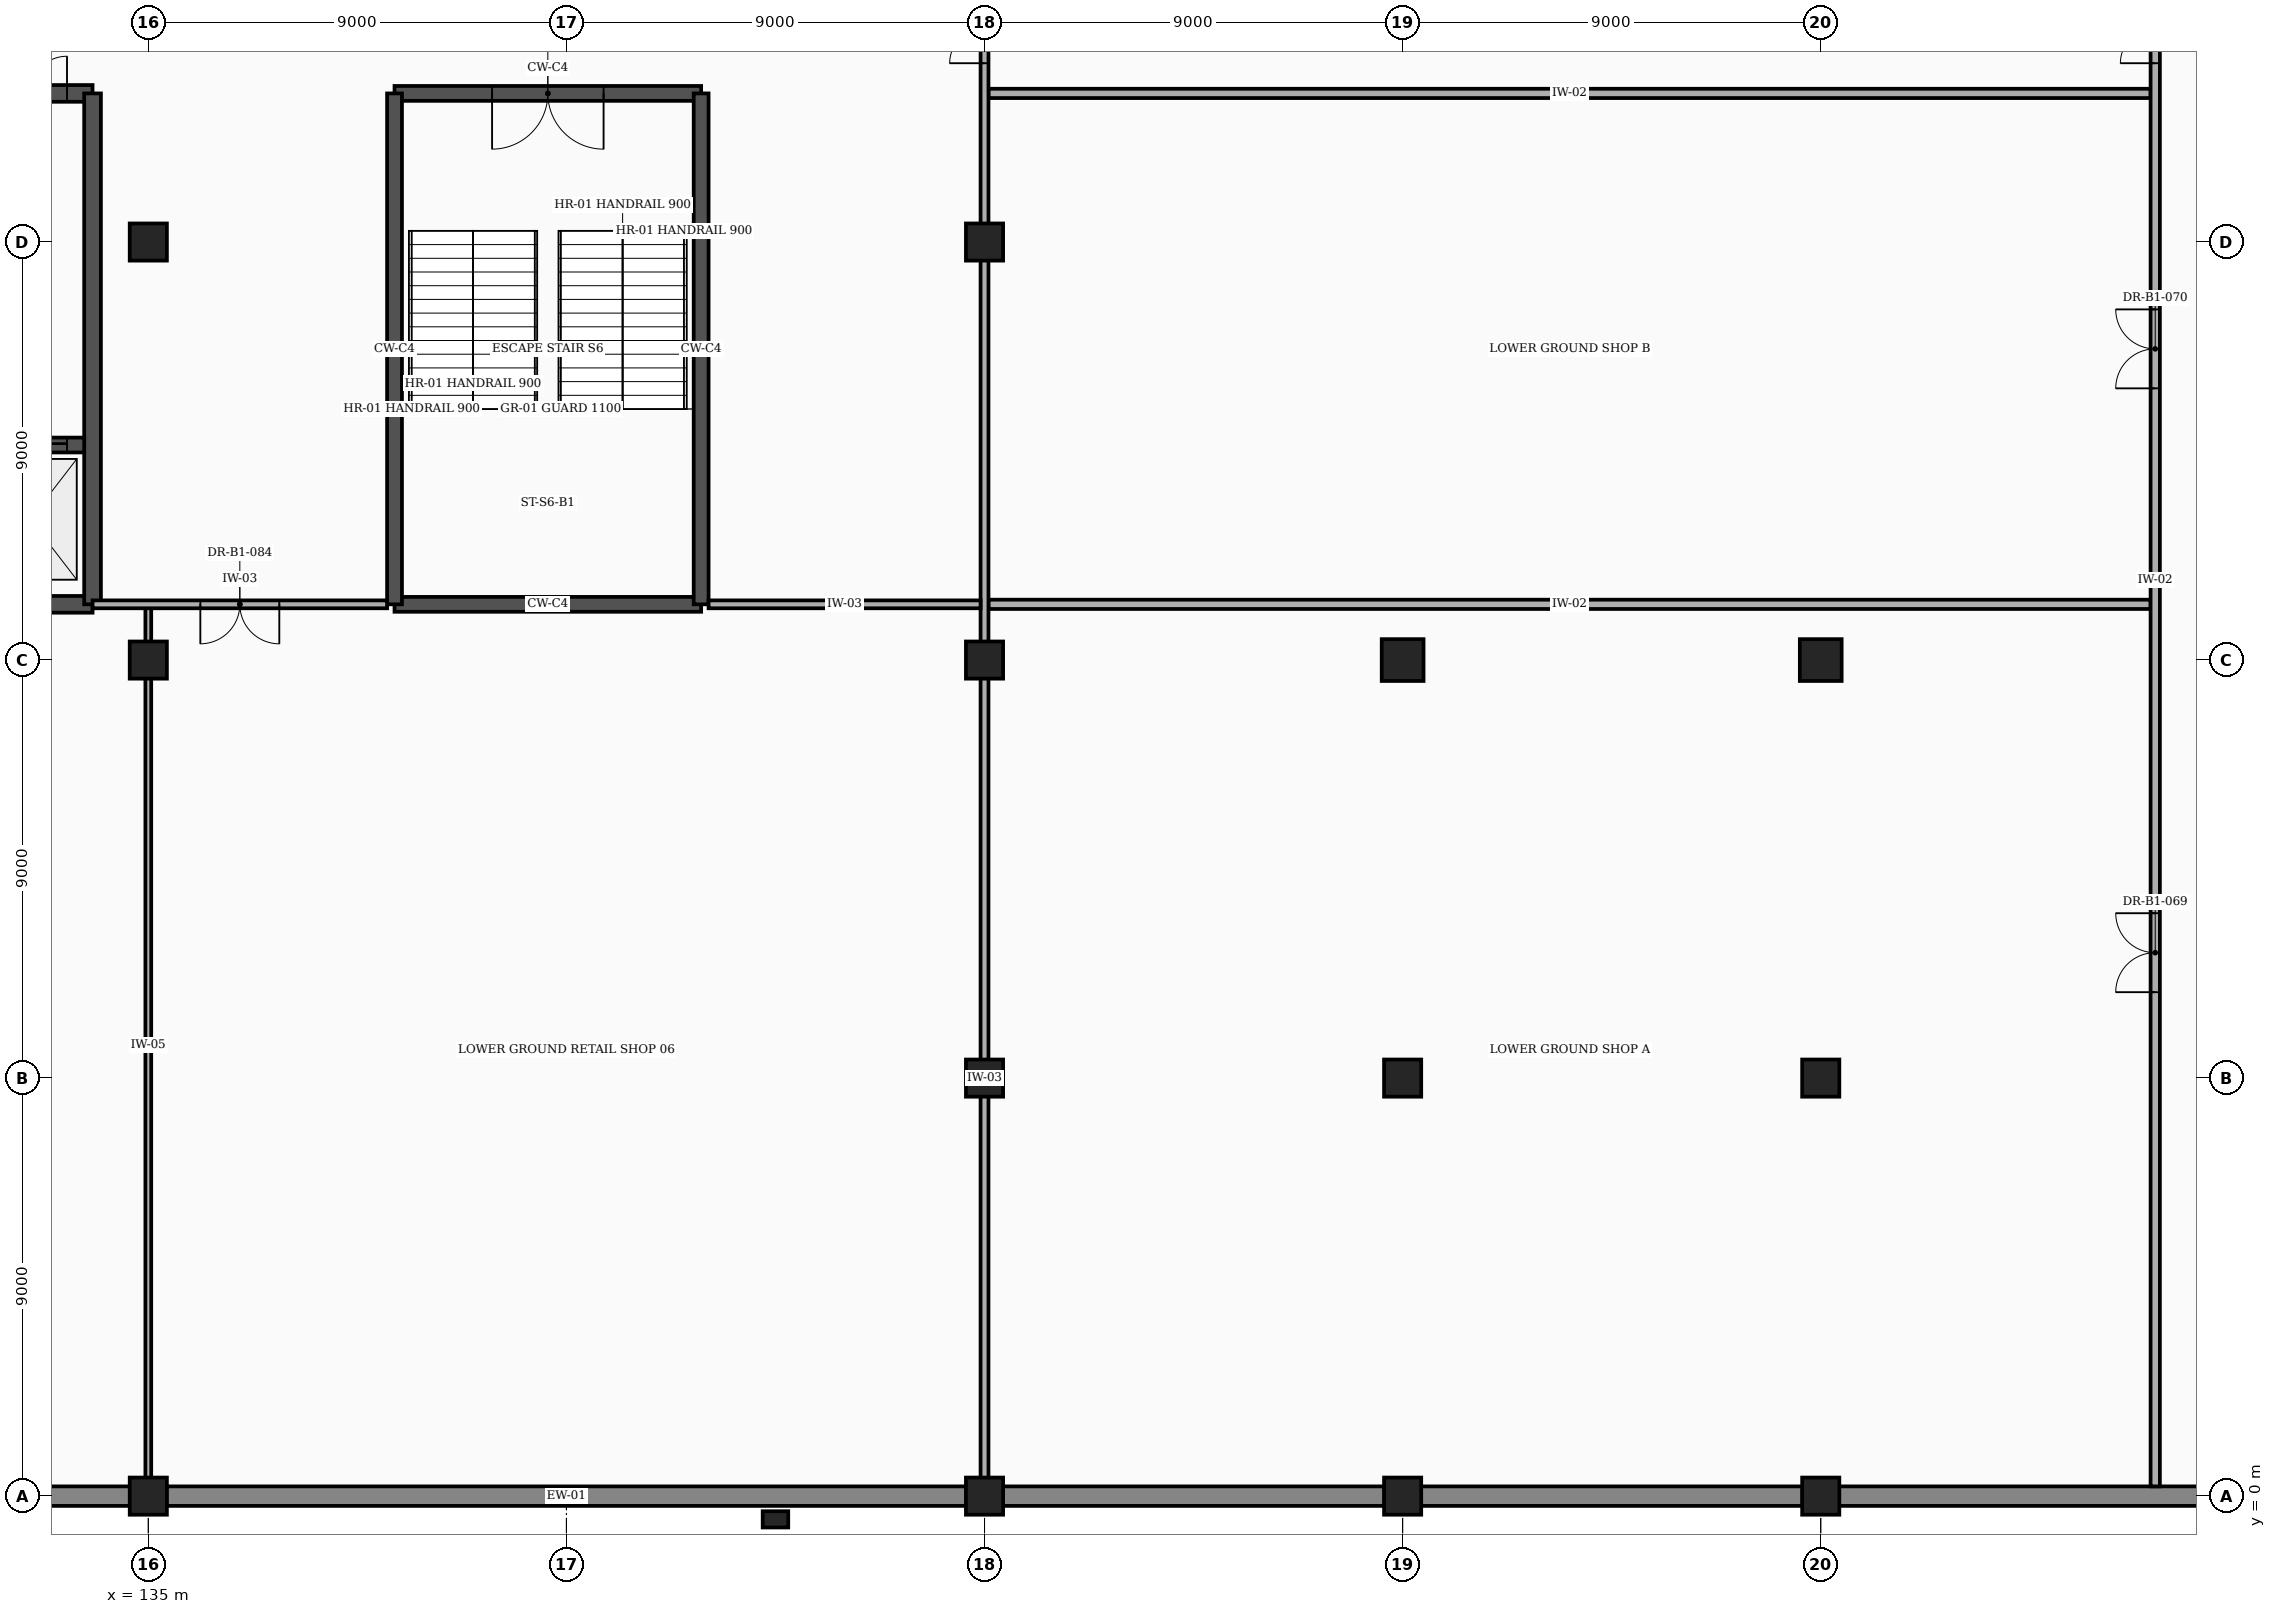
"""IFC4 building model, lengths in metres.
Left out: names, types, materials, properties, quantities, classifications, styles, units other than length and angle.
Written with IfcOpenShell. Run it as: python <this file> out.ifc"""

import sys

from ifc_helpers import new_model, si_unit, direction, frame, frame_2d, origin, origin_2d, place, context, subcontext, project, spatial, rectangle, extrude, element, fill, save


model = new_model("IFC4")
c1 = context("Model", 3, precision=1e-05, world=origin(), true_north=direction((0.0, 1.0)))
c2 = subcontext(c1, "Body", "Model", "MODEL_VIEW")
j1 = project(units=[si_unit("LENGTHUNIT", "METRE"), si_unit("PLANEANGLEUNIT", "RADIAN")], contexts=[c1])
p1 = place(None, origin())
s1 = spatial("IfcSite", under=j1, at=p1, CompositionType="ELEMENT")
p2 = place(p1, origin())
s2 = spatial("IfcBuilding", under=s1, at=p2, CompositionType="ELEMENT")
p3 = place(p2, frame((0.0, 0.0, -4.5)))
s3 = spatial("IfcBuildingStorey", under=s2, at=p3, CompositionType="ELEMENT", Elevation=-4.5)
for number, where, z_axis, x_axis in (
    (1, (135.0, 0.0, -0.45), (0.0, 0.0, 1.0), (1.0, 0.0, 0.0)),
    (2, (135.0, 18.0, -0.45), (0.0, 0.0, 1.0), (1.0, 0.0, 0.0)),
    (3, (135.0, 27.0, -0.45), (0.0, 0.0, 1.0), (1.0, 0.0, 0.0)),
    (4, (153.0, 0.0, -0.45), (0.0, 0.0, 1.0), (1.0, 0.0, 0.0)),
    (5, (153.0, 9.0, -0.45), (0.0, 0.0, 1.0), (1.0, 0.0, 0.0)),
    (6, (153.0, 18.0, -0.45), (0.0, 0.0, 1.0), (1.0, 0.0, 0.0)),
    (7, (153.0, 27.0, -0.45), (0.0, 0.0, 1.0), (1.0, 0.0, 0.0)),
    (8, (162.0, 0.0, -0.45), (0.0, 0.0, 1.0), (1.0, 0.0, 0.0)),
    (9, (162.0, 9.0, -0.45), (0.0, 0.0, 1.0), (1.0, 0.0, 0.0)),
):
    element("IfcColumn", number, at=place(p3, frame(where, z_axis=z_axis, x_axis=x_axis)), inside=s3, PredefinedType="COLUMN", context=c2, shape_type="SweptSolid", body=[
        extrude(rectangle(XDim=0.8, YDim=0.8, at=origin_2d()), origin(), (0.0, 0.0, 1.0), 4.95),
    ])
p4 = place(p3, frame((162.0, 18.0, -0.45), z_axis=(0.0, 0.0, 1.0), x_axis=(1.0, 0.0, 0.0)))
e10 = element("IfcColumn", 10, at=p4, inside=s3, PredefinedType="COLUMN", context=c2, shape_type="SweptSolid", body=[
    extrude(rectangle(XDim=0.9, YDim=0.9, at=origin_2d()), origin(), (0.0, 0.0, 1.0), 4.95),
])
for number, where, z_axis, x_axis in (
    (11, (171.0, 0.0, -0.45), (0.0, 0.0, 1.0), (1.0, 0.0, 0.0)),
    (12, (171.0, 9.0, -0.45), (0.0, 0.0, 1.0), (1.0, 0.0, 0.0)),
):
    element("IfcColumn", number, at=place(p3, frame(where, z_axis=z_axis, x_axis=x_axis)), inside=s3, PredefinedType="COLUMN", context=c2, shape_type="SweptSolid", body=[
        extrude(rectangle(XDim=0.8, YDim=0.8, at=origin_2d()), origin(), (0.0, 0.0, 1.0), 4.95),
    ])
p5 = place(p3, frame((171.0, 18.0, -0.45), z_axis=(0.0, 0.0, 1.0), x_axis=(1.0, 0.0, 0.0)))
e13 = element("IfcColumn", 13, at=p5, inside=s3, PredefinedType="COLUMN", context=c2, shape_type="SweptSolid", body=[
    extrude(rectangle(XDim=0.9, YDim=0.9, at=origin_2d()), origin(), (0.0, 0.0, 1.0), 4.95),
])
p6 = place(p3, frame((148.5, -0.5, -0.45), z_axis=(0.0, 0.0, 1.0), x_axis=(1.0, 0.0, 0.0)))
e14 = element("IfcColumn", 14, at=p6, inside=s3, PredefinedType="PILASTER", context=c2, shape_type="SweptSolid", body=[
    extrude(rectangle(XDim=0.55, YDim=0.35, at=origin_2d()), origin(), (0.0, 0.0, 1.0), 4.95),
])
for number, where, z_axis, x_axis in (
    (15, (117.392, 0.0, 0.0), (0.0, 0.0, 1.0), (1.0, 0.0, 0.0)),
    (16, (135.392, 0.0, 0.0), (0.0, 0.0, 1.0), (1.0, 0.0, 0.0)),
):
    element("IfcWall", number, at=place(p3, frame(where, z_axis=z_axis, x_axis=x_axis)), inside=s3, PredefinedType="STANDARD", context=c2, shape_type="SweptSolid", body=[
        extrude(rectangle(XDim=17.216, YDim=0.42, at=frame_2d((8.608, 0.0))), origin(), (0.0, 0.0, 1.0), 3.7),
    ])
for number, where, z_axis, x_axis in (
    (17, (153.392, 0.0, 0.0), (0.0, 0.0, 1.0), (1.0, 0.0, 0.0)),
    (18, (162.392, 0.0, 0.0), (0.0, 0.0, 1.0), (1.0, 0.0, 0.0)),
):
    element("IfcWall", number, at=place(p3, frame(where, z_axis=z_axis, x_axis=x_axis)), inside=s3, PredefinedType="STANDARD", context=c2, shape_type="SweptSolid", body=[
        extrude(rectangle(XDim=8.216, YDim=0.42, at=frame_2d((4.108, 0.0))), origin(), (0.0, 0.0, 1.0), 3.7),
    ])
p7 = place(p3, frame((171.392, 0.0, 0.0), z_axis=(0.0, 0.0, 1.0), x_axis=(1.0, 0.0, 0.0)))
e19 = element("IfcWall", 19, at=p7, inside=s3, PredefinedType="STANDARD", context=c2, shape_type="SweptSolid", body=[
    extrude(rectangle(XDim=17.216, YDim=0.42, at=frame_2d((8.608, 0.0))), origin(), (0.0, 0.0, 1.0), 3.7),
])
p8 = place(p3, frame((127.2, 19.2, 0.0), z_axis=(0.0, 0.0, 1.0), x_axis=(1.0, 0.0, 0.0)))
e20 = element("IfcWall", 20, at=p8, inside=s3, PredefinedType="SHEAR", context=c2, shape_type="SweptSolid", body=[
    extrude(rectangle(XDim=6.6, YDim=0.36, at=frame_2d((3.3, 0.0))), origin(), (0.0, 0.0, 1.0), 4.24),
])
p9 = place(p3, frame((127.2, 30.2, 0.0), z_axis=(0.0, 0.0, 1.0), x_axis=(1.0, 0.0, 0.0)))
e21 = element("IfcWall", 21, at=p9, inside=s3, PredefinedType="SHEAR", context=c2, shape_type="SweptSolid", body=[
    extrude(rectangle(XDim=6.6, YDim=0.36, at=frame_2d((3.3, 0.0))), origin(), (0.0, 0.0, 1.0), 4.24),
])
p10 = place(p9, frame((4.45, 0.0, 0.0)))
e22 = element("IfcOpeningElement", 22, at=p10, cuts=e21, PredefinedType="OPENING", context=c2, shape_type="SweptSolid", body=[
    extrude(rectangle(XDim=1.6, YDim=2.3, at=frame_2d((0.8, 1.15))), frame((0.0, 0.192, 0.0), z_axis=(0.0, -1.0, 0.0), x_axis=(1.0, 0.0, 0.0)), (0.0, 0.0, 1.0), 0.384),
])
p11 = place(p3, frame((133.8, 19.2, 0.0), z_axis=(0.0, 0.0, 1.0), x_axis=(0.0, 1.0, 0.0)))
e23 = element("IfcWall", 23, at=p11, inside=s3, PredefinedType="SHEAR", context=c2, shape_type="SweptSolid", body=[
    extrude(rectangle(XDim=11.0, YDim=0.36, at=frame_2d((5.5, 0.0))), origin(), (0.0, 0.0, 1.0), 4.24),
])
p12 = place(p3, frame((131.3, 22.63, 0.0), z_axis=(0.0, 0.0, 1.0), x_axis=(1.0, 0.0, 0.0)))
e24 = element("IfcWall", 24, at=p12, inside=s3, PredefinedType="SHEAR", context=c2, shape_type="SweptSolid", body=[
    extrude(rectangle(XDim=2.32, YDim=0.32, at=frame_2d((1.16, 0.0))), origin(), (0.0, 0.0, 1.0), 4.24),
])
p13 = place(p12, frame((0.3, 0.0, 0.0)))
e25 = element("IfcOpeningElement", 25, at=p13, cuts=e24, PredefinedType="OPENING", context=c2, shape_type="SweptSolid", body=[
    extrude(rectangle(XDim=1.65, YDim=2.35, at=frame_2d((0.825, 1.175))), frame((0.0, 0.172, 0.0), z_axis=(0.0, -1.0, 0.0), x_axis=(1.0, 0.0, 0.0)), (0.0, 0.0, 1.0), 0.344),
])
p14 = place(p3, frame((140.3, 19.2, 0.0), z_axis=(0.0, 0.0, 1.0), x_axis=(1.0, 0.0, 0.0)))
e26 = element("IfcWall", 26, at=p14, inside=s3, PredefinedType="SHEAR", context=c2, shape_type="SweptSolid", body=[
    extrude(rectangle(XDim=6.6, YDim=0.32, at=frame_2d((3.3, 0.0))), origin(), (0.0, 0.0, 1.0), 4.24),
])
p15 = place(p3, frame((140.3, 30.2, 0.0), z_axis=(0.0, 0.0, 1.0), x_axis=(1.0, 0.0, 0.0)))
e27 = element("IfcWall", 27, at=p15, inside=s3, PredefinedType="SHEAR", context=c2, shape_type="SweptSolid", body=[
    extrude(rectangle(XDim=6.6, YDim=0.32, at=frame_2d((3.3, 0.0))), origin(), (0.0, 0.0, 1.0), 4.24),
])
p16 = place(p15, frame((2.1, 0.0, 0.0)))
e28 = element("IfcOpeningElement", 28, at=p16, cuts=e27, PredefinedType="OPENING", context=c2, shape_type="SweptSolid", body=[
    extrude(rectangle(XDim=2.4, YDim=2.25, at=frame_2d((1.2, 1.125))), frame((0.0, 0.172, 0.0), z_axis=(0.0, -1.0, 0.0), x_axis=(1.0, 0.0, 0.0)), (0.0, 0.0, 1.0), 0.344),
])
for number, where, z_axis, x_axis in (
    (29, (140.3, 19.2, 0.0), (0.0, 0.0, 1.0), (0.0, 1.0, 0.0)),
    (30, (146.9, 19.2, 0.0), (0.0, 0.0, 1.0), (0.0, 1.0, 0.0)),
):
    element("IfcWall", number, at=place(p3, frame(where, z_axis=z_axis, x_axis=x_axis)), inside=s3, PredefinedType="SHEAR", context=c2, shape_type="SweptSolid", body=[
        extrude(rectangle(XDim=11.0, YDim=0.32, at=frame_2d((5.5, 0.0))), origin(), (0.0, 0.0, 1.0), 4.24),
    ])
for number, where, z_axis, x_axis in (
    (31, (153.085, 19.2, 0.0), (0.0, 0.0, 1.0), (1.0, 0.0, 0.0)),
    (32, (153.085, 30.2, 0.0), (0.0, 0.0, 1.0), (1.0, 0.0, 0.0)),
):
    element("IfcWall", number, at=place(p3, frame(where, z_axis=z_axis, x_axis=x_axis)), inside=s3, PredefinedType="PARTITIONING", context=c2, shape_type="SweptSolid", body=[
        extrude(rectangle(XDim=25.015, YDim=0.2, at=frame_2d((12.508, 0.0))), origin(), (0.0, 0.0, 1.0), 4.24),
    ])
p17 = place(p3, frame((178.2, 0.21, 0.0), z_axis=(0.0, 0.0, 1.0), x_axis=(0.0, 1.0, 0.0)))
e33 = element("IfcWall", 33, at=p17, inside=s3, PredefinedType="PARTITIONING", context=c2, shape_type="SweptSolid", body=[
    extrude(rectangle(XDim=39.03, YDim=0.2, at=frame_2d((19.515, 0.0))), origin(), (0.0, 0.0, 1.0), 4.24),
])
p18 = place(p17, frame((10.64, 0.0, 0.0)))
e34 = element("IfcOpeningElement", 34, at=p18, cuts=e33, PredefinedType="OPENING", context=c2, shape_type="SweptSolid", body=[
    extrude(rectangle(XDim=1.7, YDim=2.3, at=frame_2d((0.85, 1.15))), frame((0.0, 0.112, 0.0), z_axis=(0.0, -1.0, 0.0), x_axis=(1.0, 0.0, 0.0)), (0.0, 0.0, 1.0), 0.224),
])
p19 = place(p17, frame((23.64, 0.0, 0.0)))
e35 = element("IfcOpeningElement", 35, at=p19, cuts=e33, PredefinedType="OPENING", context=c2, shape_type="SweptSolid", body=[
    extrude(rectangle(XDim=1.7, YDim=2.3, at=frame_2d((0.85, 1.15))), frame((0.0, 0.112, 0.0), z_axis=(0.0, -1.0, 0.0), x_axis=(1.0, 0.0, 0.0)), (0.0, 0.0, 1.0), 0.224),
])
p20 = place(p17, frame((30.64, 0.0, 0.0)))
e36 = element("IfcOpeningElement", 36, at=p20, cuts=e33, PredefinedType="OPENING", context=c2, shape_type="SweptSolid", body=[
    extrude(rectangle(XDim=1.5, YDim=2.2, at=frame_2d((0.75, 1.1))), frame((0.0, 0.112, 0.0), z_axis=(0.0, -1.0, 0.0), x_axis=(1.0, 0.0, 0.0)), (0.0, 0.0, 1.0), 0.224),
])
p21 = place(p3, frame((153.0, 0.22, 0.0), z_axis=(0.0, 0.0, 1.0), x_axis=(0.0, 1.0, 0.0)))
e37 = element("IfcWall", 37, at=p21, inside=s3, PredefinedType="PARTITIONING", context=c2, shape_type="SweptSolid", body=[
    extrude(rectangle(XDim=17.56, YDim=0.17, at=frame_2d((8.78, 0.0))), origin(), (0.0, 0.0, 1.0), 3.707),
])
p22 = place(p3, frame((153.0, 18.22, 0.0), z_axis=(0.0, 0.0, 1.0), x_axis=(0.0, 1.0, 0.0)))
e38 = element("IfcWall", 38, at=p22, inside=s3, PredefinedType="PARTITIONING", context=c2, shape_type="SweptSolid", body=[
    extrude(rectangle(XDim=8.56, YDim=0.17, at=frame_2d((4.28, 0.0))), origin(), (0.0, 0.0, 1.0), 3.707),
])
p23 = place(p3, frame((153.0, 27.22, 0.0), z_axis=(0.0, 0.0, 1.0), x_axis=(0.0, 1.0, 0.0)))
e39 = element("IfcWall", 39, at=p23, inside=s3, PredefinedType="PARTITIONING", context=c2, shape_type="SweptSolid", body=[
    extrude(rectangle(XDim=8.56, YDim=0.17, at=frame_2d((4.28, 0.0))), origin(), (0.0, 0.0, 1.0), 3.707),
])
p24 = place(p23, frame((3.63, 0.0, 0.0)))
e40 = element("IfcOpeningElement", 40, at=p24, cuts=e39, PredefinedType="OPENING", context=c2, shape_type="SweptSolid", body=[
    extrude(rectangle(XDim=1.5, YDim=2.2, at=frame_2d((0.75, 1.1))), frame((0.0, 0.097, 0.0), z_axis=(0.0, -1.0, 0.0), x_axis=(1.0, 0.0, 0.0)), (0.0, 0.0, 1.0), 0.194),
])
p25 = place(p3, frame((135.0, 0.21, 0.0), z_axis=(0.0, 0.0, 1.0), x_axis=(0.0, 1.0, 0.0)))
e41 = element("IfcWall", 41, at=p25, inside=s3, PredefinedType="PARTITIONING", context=c2, shape_type="SweptSolid", body=[
    extrude(rectangle(XDim=18.99, YDim=0.125, at=frame_2d((9.495, 0.0))), origin(), (0.0, 0.0, 1.0), 3.628),
])
p26 = place(p3, frame((133.8, 19.2, 0.0), z_axis=(0.0, 0.0, 1.0), x_axis=(1.0, 0.0, 0.0)))
e42 = element("IfcWall", 42, at=p26, inside=s3, PredefinedType="PARTITIONING", context=c2, shape_type="SweptSolid", body=[
    extrude(rectangle(XDim=6.34, YDim=0.17, at=frame_2d((3.17, 0.0))), origin(), (0.0, 0.0, 1.0), 4.24),
])
p27 = place(p26, frame((2.32, 0.0, 0.0)))
e43 = element("IfcOpeningElement", 43, at=p27, cuts=e42, PredefinedType="OPENING", context=c2, shape_type="SweptSolid", body=[
    extrude(rectangle(XDim=1.7, YDim=2.3, at=frame_2d((0.85, 1.15))), frame((0.0, 0.097, 0.0), z_axis=(0.0, -1.0, 0.0), x_axis=(1.0, 0.0, 0.0)), (0.0, 0.0, 1.0), 0.194),
])
p28 = place(p3, frame((147.06, 19.2, 0.0), z_axis=(0.0, 0.0, 1.0), x_axis=(1.0, 0.0, 0.0)))
e44 = element("IfcWall", 44, at=p28, inside=s3, PredefinedType="PARTITIONING", context=c2, shape_type="SweptSolid", body=[
    extrude(rectangle(XDim=5.855, YDim=0.17, at=frame_2d((2.927, 0.0))), origin(), (0.0, 0.0, 1.0), 4.24),
])
p29 = place(p13, origin())
e45 = element("IfcDoor", 45, at=p29, inside=s3, OperationType="DOUBLE_DOOR_SLIDING", PredefinedType="DOOR", context=c2, shape_type="SweptSolid", body=[
    extrude(rectangle(XDim=1.65, YDim=2.35, at=frame_2d((0.825, 1.175))), frame((0.0, 0.025, 0.0), z_axis=(0.0, -1.0, 0.0), x_axis=(1.0, 0.0, 0.0)), (0.0, 0.0, 1.0), 0.05),
])
fill(e25, e45)
p30 = place(p10, origin())
e46 = element("IfcDoor", 46, at=p30, inside=s3, OperationType="DOUBLE_DOOR_SINGLE_SWING", PredefinedType="DOOR", context=c2, shape_type="SweptSolid", body=[
    extrude(rectangle(XDim=1.6, YDim=2.3, at=frame_2d((0.8, 1.15))), frame((0.0, 0.025, 0.0), z_axis=(0.0, -1.0, 0.0), x_axis=(1.0, 0.0, 0.0)), (0.0, 0.0, 1.0), 0.05),
])
fill(e22, e46)
p31 = place(p16, frame((2.4, 0.0, 0.0), z_axis=(0.0, 0.0, 1.0), x_axis=(-1.0, 0.0, 0.0)))
e47 = element("IfcDoor", 47, at=p31, inside=s3, OperationType="DOUBLE_DOOR_SINGLE_SWING", PredefinedType="DOOR", context=c2, shape_type="SweptSolid", body=[
    extrude(rectangle(XDim=2.4, YDim=2.25, at=frame_2d((1.2, 1.125))), frame((0.0, 0.025, 0.0), z_axis=(0.0, -1.0, 0.0), x_axis=(1.0, 0.0, 0.0)), (0.0, 0.0, 1.0), 0.05),
])
fill(e28, e47)
p32 = place(p18, origin())
e48 = element("IfcDoor", 48, at=p32, inside=s3, OperationType="DOUBLE_DOOR_SINGLE_SWING", PredefinedType="DOOR", context=c2, shape_type="SweptSolid", body=[
    extrude(rectangle(XDim=1.7, YDim=2.3, at=frame_2d((0.85, 1.15))), frame((0.0, 0.025, 0.0), z_axis=(0.0, -1.0, 0.0), x_axis=(1.0, 0.0, 0.0)), (0.0, 0.0, 1.0), 0.05),
])
fill(e34, e48)
p33 = place(p19, origin())
e49 = element("IfcDoor", 49, at=p33, inside=s3, OperationType="DOUBLE_DOOR_SINGLE_SWING", PredefinedType="DOOR", context=c2, shape_type="SweptSolid", body=[
    extrude(rectangle(XDim=1.7, YDim=2.3, at=frame_2d((0.85, 1.15))), frame((0.0, 0.025, 0.0), z_axis=(0.0, -1.0, 0.0), x_axis=(1.0, 0.0, 0.0)), (0.0, 0.0, 1.0), 0.05),
])
fill(e35, e49)
p34 = place(p20, origin())
e50 = element("IfcDoor", 50, at=p34, inside=s3, OperationType="DOUBLE_DOOR_SINGLE_SWING", PredefinedType="DOOR", context=c2, shape_type="SweptSolid", body=[
    extrude(rectangle(XDim=1.5, YDim=2.2, at=frame_2d((0.75, 1.1))), frame((0.0, 0.025, 0.0), z_axis=(0.0, -1.0, 0.0), x_axis=(1.0, 0.0, 0.0)), (0.0, 0.0, 1.0), 0.05),
])
fill(e36, e50)
p35 = place(p24, origin())
e51 = element("IfcDoor", 51, at=p35, inside=s3, OperationType="DOUBLE_DOOR_SINGLE_SWING", PredefinedType="DOOR", context=c2, shape_type="SweptSolid", body=[
    extrude(rectangle(XDim=1.5, YDim=2.2, at=frame_2d((0.75, 1.1))), frame((0.0, 0.025, 0.0), z_axis=(0.0, -1.0, 0.0), x_axis=(1.0, 0.0, 0.0)), (0.0, 0.0, 1.0), 0.05),
])
fill(e40, e51)
p36 = place(p27, frame((1.7, 0.0, 0.0), z_axis=(0.0, 0.0, 1.0), x_axis=(-1.0, 0.0, 0.0)))
e52 = element("IfcDoor", 52, at=p36, inside=s3, OperationType="DOUBLE_DOOR_SINGLE_SWING", PredefinedType="DOOR", context=c2, shape_type="SweptSolid", body=[
    extrude(rectangle(XDim=1.7, YDim=2.3, at=frame_2d((0.85, 1.15))), frame((0.0, 0.025, 0.0), z_axis=(0.0, -1.0, 0.0), x_axis=(1.0, 0.0, 0.0)), (0.0, 0.0, 1.0), 0.05),
])
fill(e43, e52)
save(model, sys.argv[1])
